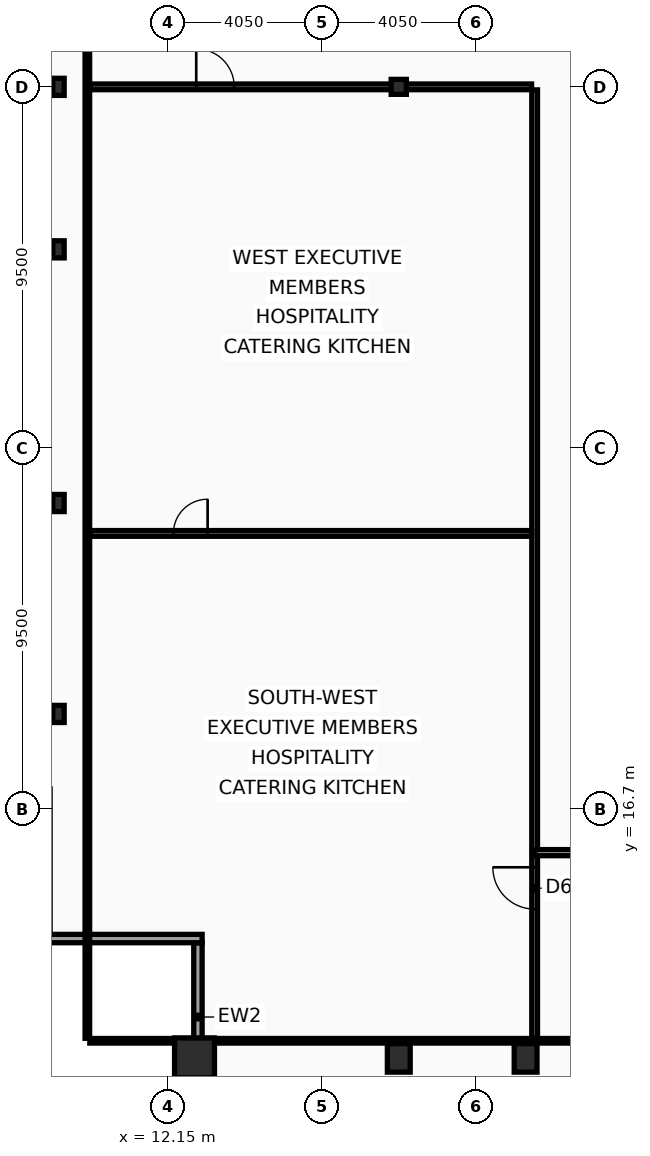
"""IFC4 building model, lengths in metres.
Left out: names, types, materials, properties, quantities, classifications, styles, units other than length and angle.
Written with IfcOpenShell. Run it as: python <this file> out.ifc"""

import sys

from ifc_helpers import new_model, si_unit, direction, frame, frame_2d, origin, origin_2d, place, context, subcontext, project, spatial, rectangle, hollow_rectangle, i_section, extrude, element, fill, save


model = new_model("IFC4")
c1 = context("Model", 3, precision=1e-05, world=origin(), true_north=direction((0.0, 1.0)))
c2 = subcontext(c1, "Body", "Model", "MODEL_VIEW")
j1 = project(units=[si_unit("LENGTHUNIT", "METRE"), si_unit("PLANEANGLEUNIT", "RADIAN")], contexts=[c1])
p1 = place(None, origin())
s1 = spatial("IfcSite", under=j1, at=p1, CompositionType="ELEMENT")
p2 = place(p1, origin())
s2 = spatial("IfcBuilding", under=s1, at=p2, CompositionType="ELEMENT")
p3 = place(p2, frame((0.0, 0.0, 280.6)))
s3 = spatial("IfcBuildingStorey", under=s2, at=p3, CompositionType="ELEMENT", Elevation=280.6)
p4 = place(p3, frame((12.85, 10.15, 0.0), z_axis=(0.0, 0.0, 1.0), x_axis=(1.0, 0.0, 0.0)))
e1 = element("IfcColumn", 1, at=p4, inside=s3, PredefinedType="COLUMN", context=c2, shape_type="SweptSolid", body=[
    extrude(hollow_rectangle(XDim=1.05, YDim=1.05, WallThickness=0.055, at=origin_2d()), origin(), (0.0, 0.0, 1.0), 3.6),
])
for number, where, z_axis, x_axis in (
    (2, (18.225, 10.15, 0.0), (0.0, 0.0, 1.0), (1.0, 0.0, 0.0)),
    (3, (21.562, 10.15, 0.0), (0.0, 0.0, 1.0), (1.0, 0.0, 0.0)),
):
    element("IfcColumn", number, at=place(p3, frame(where, z_axis=z_axis, x_axis=x_axis)), inside=s3, PredefinedType="COLUMN", context=c2, shape_type="SweptSolid", body=[
        extrude(hollow_rectangle(XDim=0.6, YDim=0.75, WallThickness=0.045, at=origin_2d()), origin(), (0.0, 0.0, 1.0), 3.6),
    ])
for number, where, z_axis, x_axis in (
    (4, (9.27, 19.2, 0.0), (0.0, 0.0, 1.0), (1.0, 0.0, 0.0)),
    (5, (9.27, 24.75, 0.0), (0.0, 0.0, 1.0), (1.0, 0.0, 0.0)),
    (6, (9.27, 31.425, 0.0), (0.0, 0.0, 1.0), (1.0, 0.0, 0.0)),
    (7, (9.27, 35.7, 0.0), (0.0, 0.0, 1.0), (1.0, 0.0, 0.0)),
):
    element("IfcColumn", number, at=place(p3, frame(where, z_axis=z_axis, x_axis=x_axis)), inside=s3, PredefinedType="COLUMN", context=c2, shape_type="SweptSolid", body=[
        extrude(i_section(OverallWidth=0.3, OverallDepth=0.45, WebThickness=0.014, FlangeThickness=0.026, at=origin_2d()), origin(), (0.0, 0.0, 1.0), 3.6),
    ])
p5 = place(p3, frame((18.225, 35.7, 0.0), z_axis=(0.0, 0.0, 1.0), x_axis=(1.0, 0.0, 0.0)))
e8 = element("IfcColumn", 8, at=p5, inside=s3, PredefinedType="COLUMN", context=c2, shape_type="SweptSolid", body=[
    extrude(i_section(OverallWidth=0.399, OverallDepth=0.393, WebThickness=0.023, FlangeThickness=0.037, at=origin_2d()), origin(), (0.0, 0.0, 1.0), 3.6),
])
p6 = place(p3, frame((12.94, 9.27, 0.0), z_axis=(0.0, 0.0, 1.0), x_axis=(0.0, 1.0, 0.0)))
e9 = element("IfcWall", 9, at=p6, inside=s3, PredefinedType="SOLIDWALL", context=c2, shape_type="SweptSolid", body=[
    extrude(rectangle(XDim=3.91, YDim=0.22, at=frame_2d((1.955, 0.0))), origin(), (0.0, 0.0, 1.0), 2.88),
])
p7 = place(p3, frame((13.05, 13.29, 0.0), z_axis=(0.0, 0.0, 1.0), x_axis=(-1.0, 0.0, 0.0)))
e10 = element("IfcWall", 10, at=p7, inside=s3, PredefinedType="SOLIDWALL", context=c2, shape_type="SweptSolid", body=[
    extrude(rectangle(XDim=4.22, YDim=0.22, at=frame_2d((2.11, 0.0))), origin(), (0.0, 0.0, 1.0), 2.88),
])
p8 = place(p3, frame((21.8, 10.665, 0.0), z_axis=(0.0, 0.0, 1.0), x_axis=(0.0, 1.0, 0.0)))
e11 = element("IfcWall", 11, at=p8, inside=s3, PredefinedType="PARTITIONING", context=c2, shape_type="SweptSolid", body=[
    extrude(rectangle(XDim=24.955, YDim=0.15, at=frame_2d((12.478, 0.0))), origin(), (0.0, 0.0, 1.0), 3.03),
])
p9 = place(p8, frame((3.4, 0.0, 0.0)))
e12 = element("IfcOpeningElement", 12, at=p9, cuts=e11, PredefinedType="OPENING", context=c2, shape_type="SweptSolid", body=[
    extrude(rectangle(XDim=1.1, YDim=2.1, at=frame_2d((0.55, 1.05))), frame((0.0, 0.085, 0.0), z_axis=(0.0, -1.0, 0.0), x_axis=(1.0, 0.0, 0.0)), (0.0, 0.0, 1.0), 0.17),
])
p10 = place(p3, frame((10.095, 35.7, 0.0), z_axis=(0.0, 0.0, 1.0), x_axis=(1.0, 0.0, 0.0)))
e13 = element("IfcWall", 13, at=p10, inside=s3, PredefinedType="PARTITIONING", context=c2, shape_type="SweptSolid", body=[
    extrude(rectangle(XDim=11.625, YDim=0.15, at=frame_2d((5.812, 0.0))), origin(), (0.0, 0.0, 1.0), 2.78),
])
p11 = place(p10, frame((2.8, 0.0, 0.0)))
e14 = element("IfcOpeningElement", 14, at=p11, cuts=e13, PredefinedType="OPENING", context=c2, shape_type="SweptSolid", body=[
    extrude(rectangle(XDim=1.0, YDim=2.05, at=frame_2d((0.5, 1.025))), frame((0.0, 0.085, 0.0), z_axis=(0.0, -1.0, 0.0), x_axis=(1.0, 0.0, 0.0)), (0.0, 0.0, 1.0), 0.17),
])
p12 = place(p3, frame((10.095, 23.95, 0.0), z_axis=(0.0, 0.0, 1.0), x_axis=(1.0, 0.0, 0.0)))
e15 = element("IfcWall", 15, at=p12, inside=s3, PredefinedType="PARTITIONING", context=c2, shape_type="SweptSolid", body=[
    extrude(rectangle(XDim=11.625, YDim=0.15, at=frame_2d((5.812, 0.0))), origin(), (0.0, 0.0, 1.0), 2.78),
])
p13 = place(p12, frame((2.2, 0.0, 0.0)))
e16 = element("IfcOpeningElement", 16, at=p13, cuts=e15, PredefinedType="OPENING", context=c2, shape_type="SweptSolid", body=[
    extrude(rectangle(XDim=0.9, YDim=2.05, at=frame_2d((0.45, 1.025))), frame((0.0, 0.085, 0.0), z_axis=(0.0, -1.0, 0.0), x_axis=(1.0, 0.0, 0.0)), (0.0, 0.0, 1.0), 0.17),
])
p14 = place(p3, frame((21.8, 15.55, 0.0), z_axis=(0.0, 0.0, 1.0), x_axis=(1.0, 0.0, 0.0)))
e17 = element("IfcWall", 17, at=p14, inside=s3, PredefinedType="PARTITIONING", context=c2, shape_type="SweptSolid", body=[
    extrude(rectangle(XDim=7.576, YDim=0.16, at=frame_2d((3.788, 0.0))), origin(), (0.0, 0.0, 1.0), 2.78),
])
p15 = place(p14, frame((3.432, 0.0, 0.0)))
e18 = element("IfcOpeningElement", 18, at=p15, cuts=e17, PredefinedType="OPENING", context=c2, shape_type="SweptSolid", body=[
    extrude(rectangle(XDim=1.0, YDim=2.05, at=frame_2d((0.5, 1.025))), frame((0.0, 0.09, 0.0), z_axis=(0.0, -1.0, 0.0), x_axis=(1.0, 0.0, 0.0)), (0.0, 0.0, 1.0), 0.18),
])
p16 = place(p3, frame((10.03, 10.665, 0.0), z_axis=(0.0, 0.0, 1.0), x_axis=(0.0, 1.0, 0.0)))
e19 = element("IfcWall", 19, at=p16, inside=s3, PredefinedType="PARTITIONING", context=c2, shape_type="SweptSolid", body=[
    extrude(rectangle(XDim=42.11, YDim=0.12, at=frame_2d((21.055, 0.0))), origin(), (0.0, 0.0, 1.0), 2.78),
])
p17 = place(p3, frame((10.095, 10.6, 0.0), z_axis=(0.0, 0.0, 1.0), x_axis=(1.0, 0.0, 0.0)))
e20 = element("IfcWall", 20, at=p17, inside=s3, PredefinedType="PARTITIONING", context=c2, shape_type="SweptSolid", body=[
    extrude(rectangle(XDim=52.71, YDim=0.12, at=frame_2d((26.355, 0.0))), origin(), (0.0, 0.0, 1.0), 2.78),
])
p18 = place(p9, origin())
e21 = element("IfcDoor", 21, at=p18, inside=s3, OperationType="SINGLE_SWING_RIGHT", PredefinedType="DOOR", context=c2, shape_type="SweptSolid", body=[
    extrude(rectangle(XDim=1.1, YDim=2.1, at=frame_2d((0.55, 1.05))), frame((0.0, 0.025, 0.0), z_axis=(0.0, -1.0, 0.0), x_axis=(1.0, 0.0, 0.0)), (0.0, 0.0, 1.0), 0.05),
])
fill(e12, e21)
p19 = place(p11, origin())
e22 = element("IfcDoor", 22, at=p19, inside=s3, OperationType="SINGLE_SWING_LEFT", PredefinedType="DOOR", context=c2, shape_type="SweptSolid", body=[
    extrude(rectangle(XDim=1.0, YDim=2.05, at=frame_2d((0.5, 1.025))), frame((0.0, 0.025, 0.0), z_axis=(0.0, -1.0, 0.0), x_axis=(1.0, 0.0, 0.0)), (0.0, 0.0, 1.0), 0.05),
])
fill(e14, e22)
p20 = place(p13, origin())
e23 = element("IfcDoor", 23, at=p20, inside=s3, OperationType="SINGLE_SWING_RIGHT", PredefinedType="DOOR", context=c2, shape_type="SweptSolid", body=[
    extrude(rectangle(XDim=0.9, YDim=2.05, at=frame_2d((0.45, 1.025))), frame((0.0, 0.025, 0.0), z_axis=(0.0, -1.0, 0.0), x_axis=(1.0, 0.0, 0.0)), (0.0, 0.0, 1.0), 0.05),
])
fill(e16, e23)
save(model, sys.argv[1])
